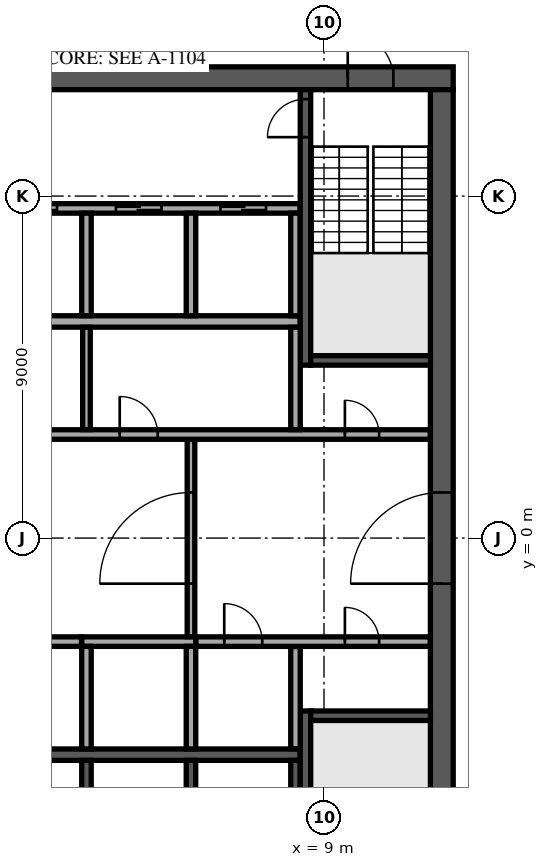
"""IFC4 building model, lengths in metres.
Left out: names, types, materials, properties, quantities, classifications, styles, units other than length and angle.
Written with IfcOpenShell. Run it as: python <this file> out.ifc"""

import sys

from ifc_helpers import new_model, si_unit, direction, frame, frame_2d, origin, place, context, subcontext, project, spatial, rectangle, extrude, element, fill, save


model = new_model("IFC4")
c1 = context("Model", 3, precision=1e-05, world=origin(), true_north=direction((0.0, 1.0)))
c2 = subcontext(c1, "Body", "Model", "MODEL_VIEW")
j1 = project(units=[si_unit("LENGTHUNIT", "METRE"), si_unit("PLANEANGLEUNIT", "RADIAN")], contexts=[c1])
p1 = place(None, origin())
s1 = spatial("IfcSite", under=j1, at=p1, CompositionType="ELEMENT")
p2 = place(p1, origin())
s2 = spatial("IfcBuilding", under=s1, at=p2, CompositionType="ELEMENT")
p3 = place(p2, frame((0.0, 0.0, 304.5)))
s3 = spatial("IfcBuildingStorey", under=s2, at=p3, CompositionType="ELEMENT", Elevation=304.5)
p4 = place(p3, frame((-12.4, 12.1, 0.0), z_axis=(0.0, 0.0, 1.0), x_axis=(1.0, 0.0, 0.0)))
e1 = element("IfcWall", 1, at=p4, inside=s3, PredefinedType="SHEAR", context=c2, shape_type="SweptSolid", body=[
    extrude(rectangle(XDim=24.8, YDim=0.6, at=frame_2d((12.4, 0.0))), origin(), (0.0, 0.0, 1.0), 3.65),
])
p5 = place(p4, frame((11.2, 0.0, 0.0)))
e2 = element("IfcOpeningElement", 2, at=p5, cuts=e1, PredefinedType="OPENING", context=c2, shape_type="SweptSolid", body=[
    extrude(rectangle(XDim=2.4, YDim=2.4, at=frame_2d((1.2, 1.2))), frame((0.0, 0.31, 0.0), z_axis=(0.0, -1.0, 0.0), x_axis=(1.0, 0.0, 0.0)), (0.0, 0.0, 1.0), 0.62),
])
p6 = place(p4, frame((22.025, 0.0, 0.0)))
e3 = element("IfcOpeningElement", 3, at=p6, cuts=e1, PredefinedType="OPENING", context=c2, shape_type="SweptSolid", body=[
    extrude(rectangle(XDim=1.2, YDim=2.1, at=frame_2d((0.6, 1.05))), frame((0.0, 0.31, 0.0), z_axis=(0.0, -1.0, 0.0), x_axis=(1.0, 0.0, 0.0)), (0.0, 0.0, 1.0), 0.62),
])
p7 = place(p4, frame((1.0, 0.0, 0.0)))
e4 = element("IfcOpeningElement", 4, at=p7, cuts=e1, PredefinedType="OPENING", context=c2, shape_type="SweptSolid", body=[
    extrude(rectangle(XDim=1.0, YDim=2.1, at=frame_2d((0.5, 1.05))), frame((0.0, 0.31, 0.0), z_axis=(0.0, -1.0, 0.0), x_axis=(1.0, 0.0, 0.0)), (0.0, 0.0, 1.0), 0.62),
])
p8 = place(p3, frame((12.1, -11.8, 0.0), z_axis=(0.0, 0.0, 1.0), x_axis=(0.0, 1.0, 0.0)))
e5 = element("IfcWall", 5, at=p8, inside=s3, PredefinedType="SHEAR", context=c2, shape_type="SweptSolid", body=[
    extrude(rectangle(XDim=23.6, YDim=0.6, at=frame_2d((11.8, 0.0))), origin(), (0.0, 0.0, 1.0), 3.65),
])
p9 = place(p8, frame((10.6, 0.0, 0.0)))
e6 = element("IfcOpeningElement", 6, at=p9, cuts=e5, PredefinedType="OPENING", context=c2, shape_type="SweptSolid", body=[
    extrude(rectangle(XDim=2.4, YDim=2.4, at=frame_2d((1.2, 1.2))), frame((0.0, 0.31, 0.0), z_axis=(0.0, -1.0, 0.0), x_axis=(1.0, 0.0, 0.0)), (0.0, 0.0, 1.0), 0.62),
])
p10 = place(p3, frame((-8.375, 5.7, 0.0), z_axis=(0.0, 0.0, 1.0), x_axis=(1.0, 0.0, 0.0)))
e7 = element("IfcWall", 7, at=p10, inside=s3, PredefinedType="SOLIDWALL", context=c2, shape_type="SweptSolid", body=[
    extrude(rectangle(XDim=16.75, YDim=0.3, at=frame_2d((8.375, 0.0))), origin(), (0.0, 0.0, 1.0), 3.65),
])
p11 = place(p3, frame((-2.875, -5.7, 0.0), z_axis=(0.0, 0.0, 1.0), x_axis=(1.0, 0.0, 0.0)))
e8 = element("IfcWall", 8, at=p11, inside=s3, PredefinedType="SOLIDWALL", context=c2, shape_type="SweptSolid", body=[
    extrude(rectangle(XDim=11.25, YDim=0.3, at=frame_2d((5.625, 0.0))), origin(), (0.0, 0.0, 1.0), 3.65),
])
p12 = place(p3, frame((-8.375, 8.675, 0.0), z_axis=(0.0, 0.0, 1.0), x_axis=(1.0, 0.0, 0.0)))
e9 = element("IfcWall", 9, at=p12, inside=s3, PredefinedType="SOLIDWALL", context=c2, shape_type="SweptSolid", body=[
    extrude(rectangle(XDim=16.75, YDim=0.25, at=frame_2d((8.375, 0.0))), origin(), (0.0, 0.0, 1.0), 3.65),
])
p13 = place(p12, frame((0.9, 0.0, 0.0)))
e10 = element("IfcOpeningElement", 10, at=p13, cuts=e9, PredefinedType="OPENING", context=c2, shape_type="SweptSolid", body=[
    extrude(rectangle(XDim=1.2, YDim=2.1, at=frame_2d((0.6, 1.05))), frame((0.0, 0.135, 0.0), z_axis=(0.0, -1.0, 0.0), x_axis=(1.0, 0.0, 0.0)), (0.0, 0.0, 1.0), 0.27),
])
p14 = place(p12, frame((3.65, 0.0, 0.0)))
e11 = element("IfcOpeningElement", 11, at=p14, cuts=e9, PredefinedType="OPENING", context=c2, shape_type="SweptSolid", body=[
    extrude(rectangle(XDim=1.2, YDim=2.1, at=frame_2d((0.6, 1.05))), frame((0.0, 0.135, 0.0), z_axis=(0.0, -1.0, 0.0), x_axis=(1.0, 0.0, 0.0)), (0.0, 0.0, 1.0), 0.27),
])
p15 = place(p12, frame((6.4, 0.0, 0.0)))
e12 = element("IfcOpeningElement", 12, at=p15, cuts=e9, PredefinedType="OPENING", context=c2, shape_type="SweptSolid", body=[
    extrude(rectangle(XDim=1.2, YDim=2.1, at=frame_2d((0.6, 1.05))), frame((0.0, 0.135, 0.0), z_axis=(0.0, -1.0, 0.0), x_axis=(1.0, 0.0, 0.0)), (0.0, 0.0, 1.0), 0.27),
])
p16 = place(p12, frame((9.15, 0.0, 0.0)))
e13 = element("IfcOpeningElement", 13, at=p16, cuts=e9, PredefinedType="OPENING", context=c2, shape_type="SweptSolid", body=[
    extrude(rectangle(XDim=1.2, YDim=2.1, at=frame_2d((0.6, 1.05))), frame((0.0, 0.135, 0.0), z_axis=(0.0, -1.0, 0.0), x_axis=(1.0, 0.0, 0.0)), (0.0, 0.0, 1.0), 0.27),
])
p17 = place(p12, frame((11.9, 0.0, 0.0)))
e14 = element("IfcOpeningElement", 14, at=p17, cuts=e9, PredefinedType="OPENING", context=c2, shape_type="SweptSolid", body=[
    extrude(rectangle(XDim=1.2, YDim=2.1, at=frame_2d((0.6, 1.05))), frame((0.0, 0.135, 0.0), z_axis=(0.0, -1.0, 0.0), x_axis=(1.0, 0.0, 0.0)), (0.0, 0.0, 1.0), 0.27),
])
p18 = place(p12, frame((14.65, 0.0, 0.0)))
e15 = element("IfcOpeningElement", 15, at=p18, cuts=e9, PredefinedType="OPENING", context=c2, shape_type="SweptSolid", body=[
    extrude(rectangle(XDim=1.2, YDim=2.1, at=frame_2d((0.6, 1.05))), frame((0.0, 0.135, 0.0), z_axis=(0.0, -1.0, 0.0), x_axis=(1.0, 0.0, 0.0)), (0.0, 0.0, 1.0), 0.27),
])
for number, where, z_axis, x_axis in (
    (16, (2.75, 5.85, 0.0), (0.0, 0.0, 1.0), (0.0, 1.0, 0.0)),
    (17, (5.5, 5.85, 0.0), (0.0, 0.0, 1.0), (0.0, 1.0, 0.0)),
    (18, (8.25, 5.85, 0.0), (0.0, 0.0, 1.0), (0.0, 1.0, 0.0)),
):
    element("IfcWall", number, at=place(p3, frame(where, z_axis=z_axis, x_axis=x_axis)), inside=s3, PredefinedType="SOLIDWALL", context=c2, shape_type="SweptSolid", body=[
        extrude(rectangle(XDim=2.7, YDim=0.25, at=frame_2d((1.35, 0.0))), origin(), (0.0, 0.0, 1.0), 3.65),
    ])
p19 = place(p3, frame((2.625, -2.725, 0.0), z_axis=(0.0, 0.0, 1.0), x_axis=(1.0, 0.0, 0.0)))
e19 = element("IfcWall", 19, at=p19, inside=s3, PredefinedType="SOLIDWALL", context=c2, shape_type="SweptSolid", body=[
    extrude(rectangle(XDim=3.0, YDim=0.25, at=frame_2d((1.5, 0.0))), origin(), (0.0, 0.0, 1.0), 3.65),
])
for number, where, z_axis, x_axis in (
    (20, (2.75, -5.55, 0.0), (0.0, 0.0, 1.0), (0.0, 1.0, 0.0)),
    (21, (5.5, -5.55, 0.0), (0.0, 0.0, 1.0), (0.0, 1.0, 0.0)),
    (22, (2.75, -8.55, 0.0), (0.0, 0.0, 1.0), (0.0, 1.0, 0.0)),
    (23, (5.5, -8.55, 0.0), (0.0, 0.0, 1.0), (0.0, 1.0, 0.0)),
    (24, (8.25, -8.55, 0.0), (0.0, 0.0, 1.0), (0.0, 1.0, 0.0)),
):
    element("IfcWall", number, at=place(p3, frame(where, z_axis=z_axis, x_axis=x_axis)), inside=s3, PredefinedType="SOLIDWALL", context=c2, shape_type="SweptSolid", body=[
        extrude(rectangle(XDim=2.7, YDim=0.25, at=frame_2d((1.35, 0.0))), origin(), (0.0, 0.0, 1.0), 3.65),
    ])
p20 = place(p3, frame((8.512, 4.55, 0.0), z_axis=(0.0, 0.0, 1.0), x_axis=(0.0, 1.0, 0.0)))
e25 = element("IfcWall", 25, at=p20, inside=s3, PredefinedType="SOLIDWALL", context=c2, shape_type="SweptSolid", body=[
    extrude(rectangle(XDim=7.25, YDim=0.275, at=frame_2d((3.625, 0.0))), origin(), (0.0, 0.0, 1.0), 3.65),
])
p21 = place(p20, frame((6.0, 0.0, 0.0)))
e26 = element("IfcOpeningElement", 26, at=p21, cuts=e25, PredefinedType="OPENING", context=c2, shape_type="SweptSolid", body=[
    extrude(rectangle(XDim=1.0, YDim=2.1, at=frame_2d((0.5, 1.05))), frame((0.0, 0.147, 0.0), z_axis=(0.0, -1.0, 0.0), x_axis=(1.0, 0.0, 0.0)), (0.0, 0.0, 1.0), 0.295),
])
p22 = place(p3, frame((8.65, 4.675, 0.0), z_axis=(0.0, 0.0, 1.0), x_axis=(1.0, 0.0, 0.0)))
e27 = element("IfcWall", 27, at=p22, inside=s3, PredefinedType="SOLIDWALL", context=c2, shape_type="SweptSolid", body=[
    extrude(rectangle(XDim=3.15, YDim=0.25, at=frame_2d((1.575, 0.0))), origin(), (0.0, 0.0, 1.0), 3.65),
])
p23 = place(p3, frame((8.512, -4.55, 0.0), z_axis=(0.0, 0.0, 1.0), x_axis=(0.0, -1.0, 0.0)))
e28 = element("IfcWall", 28, at=p23, inside=s3, PredefinedType="SOLIDWALL", context=c2, shape_type="SweptSolid", body=[
    extrude(rectangle(XDim=7.25, YDim=0.275, at=frame_2d((3.625, 0.0))), origin(), (0.0, 0.0, 1.0), 3.65),
])
p24 = place(p23, frame((6.0, 0.0, 0.0)))
e29 = element("IfcOpeningElement", 29, at=p24, cuts=e28, PredefinedType="OPENING", context=c2, shape_type="SweptSolid", body=[
    extrude(rectangle(XDim=1.0, YDim=2.1, at=frame_2d((0.5, 1.05))), frame((0.0, 0.147, 0.0), z_axis=(0.0, -1.0, 0.0), x_axis=(1.0, 0.0, 0.0)), (0.0, 0.0, 1.0), 0.295),
])
p25 = place(p3, frame((8.65, -4.675, 0.0), z_axis=(0.0, 0.0, 1.0), x_axis=(1.0, 0.0, 0.0)))
e30 = element("IfcWall", 30, at=p25, inside=s3, PredefinedType="SOLIDWALL", context=c2, shape_type="SweptSolid", body=[
    extrude(rectangle(XDim=3.15, YDim=0.25, at=frame_2d((1.575, 0.0))), origin(), (0.0, 0.0, 1.0), 3.65),
])
p26 = place(p3, frame((8.25, -5.545, 0.0), z_axis=(0.0, 0.0, 1.0), x_axis=(0.0, 1.0, 0.0)))
e31 = element("IfcWall", 31, at=p26, inside=s3, PredefinedType="PARTITIONING", context=c2, shape_type="SweptSolid", body=[
    extrude(rectangle(XDim=2.69, YDim=0.25, at=frame_2d((1.345, 0.0))), origin(), (0.0, 0.0, 1.0), 3.65),
])
p27 = place(p3, frame((-11.795, -2.725, 0.0), z_axis=(0.0, 0.0, 1.0), x_axis=(1.0, 0.0, 0.0)))
e32 = element("IfcWall", 32, at=p27, inside=s3, PredefinedType="PARTITIONING", context=c2, shape_type="SweptSolid", body=[
    extrude(rectangle(XDim=14.415, YDim=0.25, at=frame_2d((7.208, 0.0))), origin(), (0.0, 0.0, 1.0), 3.65),
])
p28 = place(p27, frame((1.295, 0.0, 0.0)))
e33 = element("IfcOpeningElement", 33, at=p28, cuts=e32, PredefinedType="OPENING", context=c2, shape_type="SweptSolid", body=[
    extrude(rectangle(XDim=1.0, YDim=2.1, at=frame_2d((0.5, 1.05))), frame((0.0, 0.135, 0.0), z_axis=(0.0, -1.0, 0.0), x_axis=(1.0, 0.0, 0.0)), (0.0, 0.0, 1.0), 0.27),
])
p29 = place(p27, frame((4.42, 0.0, 0.0)))
e34 = element("IfcOpeningElement", 34, at=p29, cuts=e32, PredefinedType="OPENING", context=c2, shape_type="SweptSolid", body=[
    extrude(rectangle(XDim=1.0, YDim=2.1, at=frame_2d((0.5, 1.05))), frame((0.0, 0.135, 0.0), z_axis=(0.0, -1.0, 0.0), x_axis=(1.0, 0.0, 0.0)), (0.0, 0.0, 1.0), 0.27),
])
p30 = place(p27, frame((9.92, 0.0, 0.0)))
e35 = element("IfcOpeningElement", 35, at=p30, cuts=e32, PredefinedType="OPENING", context=c2, shape_type="SweptSolid", body=[
    extrude(rectangle(XDim=1.0, YDim=2.1, at=frame_2d((0.5, 1.05))), frame((0.0, 0.135, 0.0), z_axis=(0.0, -1.0, 0.0), x_axis=(1.0, 0.0, 0.0)), (0.0, 0.0, 1.0), 0.27),
])
p31 = place(p3, frame((5.63, -2.725, 0.0), z_axis=(0.0, 0.0, 1.0), x_axis=(1.0, 0.0, 0.0)))
e36 = element("IfcWall", 36, at=p31, inside=s3, PredefinedType="PARTITIONING", context=c2, shape_type="SweptSolid", body=[
    extrude(rectangle(XDim=6.165, YDim=0.25, at=frame_2d((3.083, 0.0))), origin(), (0.0, 0.0, 1.0), 3.65),
])
p32 = place(p31, frame((0.745, 0.0, 0.0)))
e37 = element("IfcOpeningElement", 37, at=p32, cuts=e36, PredefinedType="OPENING", context=c2, shape_type="SweptSolid", body=[
    extrude(rectangle(XDim=1.0, YDim=2.1, at=frame_2d((0.5, 1.05))), frame((0.0, 0.135, 0.0), z_axis=(0.0, -1.0, 0.0), x_axis=(1.0, 0.0, 0.0)), (0.0, 0.0, 1.0), 0.27),
])
p33 = place(p31, frame((3.92, 0.0, 0.0)))
e38 = element("IfcOpeningElement", 38, at=p33, cuts=e36, PredefinedType="OPENING", context=c2, shape_type="SweptSolid", body=[
    extrude(rectangle(XDim=0.9, YDim=2.1, at=frame_2d((0.45, 1.05))), frame((0.0, 0.135, 0.0), z_axis=(0.0, -1.0, 0.0), x_axis=(1.0, 0.0, 0.0)), (0.0, 0.0, 1.0), 0.27),
])
p34 = place(p3, frame((5.5, -2.595, 0.0), z_axis=(0.0, 0.0, 1.0), x_axis=(0.0, 1.0, 0.0)))
e39 = element("IfcWall", 39, at=p34, inside=s3, PredefinedType="PARTITIONING", context=c2, shape_type="SweptSolid", body=[
    extrude(rectangle(XDim=5.19, YDim=0.2, at=frame_2d((2.595, 0.0))), origin(), (0.0, 0.0, 1.0), 3.65),
])
p35 = place(p34, frame((1.395, 0.0, 0.0)))
e40 = element("IfcOpeningElement", 40, at=p35, cuts=e39, PredefinedType="OPENING", context=c2, shape_type="SweptSolid", body=[
    extrude(rectangle(XDim=2.4, YDim=2.4, at=frame_2d((1.2, 1.2))), frame((0.0, 0.11, 0.0), z_axis=(0.0, -1.0, 0.0), x_axis=(1.0, 0.0, 0.0)), (0.0, 0.0, 1.0), 0.22),
])
p36 = place(p3, frame((-11.795, 2.725, 0.0), z_axis=(0.0, 0.0, 1.0), x_axis=(1.0, 0.0, 0.0)))
e41 = element("IfcWall", 41, at=p36, inside=s3, PredefinedType="PARTITIONING", context=c2, shape_type="SweptSolid", body=[
    extrude(rectangle(XDim=23.59, YDim=0.25, at=frame_2d((11.795, 0.0))), origin(), (0.0, 0.0, 1.0), 3.65),
])
p37 = place(p36, frame((21.345, 0.0, 0.0)))
e42 = element("IfcOpeningElement", 42, at=p37, cuts=e41, PredefinedType="OPENING", context=c2, shape_type="SweptSolid", body=[
    extrude(rectangle(XDim=0.9, YDim=2.1, at=frame_2d((0.45, 1.05))), frame((0.0, 0.135, 0.0), z_axis=(0.0, -1.0, 0.0), x_axis=(1.0, 0.0, 0.0)), (0.0, 0.0, 1.0), 0.27),
])
p38 = place(p36, frame((1.345, 0.0, 0.0)))
e43 = element("IfcOpeningElement", 43, at=p38, cuts=e41, PredefinedType="OPENING", context=c2, shape_type="SweptSolid", body=[
    extrude(rectangle(XDim=0.9, YDim=2.1, at=frame_2d((0.45, 1.05))), frame((0.0, 0.135, 0.0), z_axis=(0.0, -1.0, 0.0), x_axis=(1.0, 0.0, 0.0)), (0.0, 0.0, 1.0), 0.27),
])
p39 = place(p36, frame((4.32, 0.0, 0.0)))
e44 = element("IfcOpeningElement", 44, at=p39, cuts=e41, PredefinedType="OPENING", context=c2, shape_type="SweptSolid", body=[
    extrude(rectangle(XDim=1.2, YDim=2.1, at=frame_2d((0.6, 1.05))), frame((0.0, 0.135, 0.0), z_axis=(0.0, -1.0, 0.0), x_axis=(1.0, 0.0, 0.0)), (0.0, 0.0, 1.0), 0.27),
])
p40 = place(p36, frame((15.42, 0.0, 0.0)))
e45 = element("IfcOpeningElement", 45, at=p40, cuts=e41, PredefinedType="OPENING", context=c2, shape_type="SweptSolid", body=[
    extrude(rectangle(XDim=1.0, YDim=2.1, at=frame_2d((0.5, 1.05))), frame((0.0, 0.135, 0.0), z_axis=(0.0, -1.0, 0.0), x_axis=(1.0, 0.0, 0.0)), (0.0, 0.0, 1.0), 0.27),
])
p41 = place(p3, frame((2.75, 2.855, 0.0), z_axis=(0.0, 0.0, 1.0), x_axis=(0.0, 1.0, 0.0)))
e46 = element("IfcWall", 46, at=p41, inside=s3, PredefinedType="PARTITIONING", context=c2, shape_type="SweptSolid", body=[
    extrude(rectangle(XDim=2.69, YDim=0.2, at=frame_2d((1.345, 0.0))), origin(), (0.0, 0.0, 1.0), 3.65),
])
p42 = place(p3, frame((8.25, 2.855, 0.0), z_axis=(0.0, 0.0, 1.0), x_axis=(0.0, 1.0, 0.0)))
e47 = element("IfcWall", 47, at=p42, inside=s3, PredefinedType="PARTITIONING", context=c2, shape_type="SweptSolid", body=[
    extrude(rectangle(XDim=2.69, YDim=0.25, at=frame_2d((1.345, 0.0))), origin(), (0.0, 0.0, 1.0), 3.65),
])
p43 = place(p3, frame((-11.549, 24.631, 0.0), z_axis=(0.0, 0.0, 1.0), x_axis=(0.939685979246, -0.342038390256, 0.0)))
e48 = element("IfcWall", 48, at=p43, inside=s3, PredefinedType="PARTITIONING", context=c2, shape_type="SweptSolid", body=[
    extrude(rectangle(XDim=38.628, YDim=0.15, at=frame_2d((19.314, 0.0))), origin(), (0.0, 0.0, 1.0), 3.25),
])
p44 = place(p43, frame((5.05, 0.0, 0.0)))
e49 = element("IfcOpeningElement", 49, at=p44, cuts=e48, PredefinedType="OPENING", context=c2, shape_type="SweptSolid", body=[
    extrude(rectangle(XDim=1.8, YDim=2.1, at=frame_2d((0.9, 1.05))), frame((0.0, 0.085, 0.0), z_axis=(0.0, -1.0, 0.0), x_axis=(1.0, 0.0, 0.0)), (0.0, 0.0, 1.0), 0.17),
])
p45 = place(p43, frame((10.046, 0.0, 0.0)))
e50 = element("IfcOpeningElement", 50, at=p45, cuts=e48, PredefinedType="OPENING", context=c2, shape_type="SweptSolid", body=[
    extrude(rectangle(XDim=1.0, YDim=2.1, at=frame_2d((0.5, 1.05))), frame((0.0, 0.085, 0.0), z_axis=(0.0, -1.0, 0.0), x_axis=(1.0, 0.0, 0.0)), (0.0, 0.0, 1.0), 0.17),
])
p46 = place(p43, frame((15.561, 0.0, 0.0)))
e51 = element("IfcOpeningElement", 51, at=p46, cuts=e48, PredefinedType="OPENING", context=c2, shape_type="SweptSolid", body=[
    extrude(rectangle(XDim=1.0, YDim=2.1, at=frame_2d((0.5, 1.05))), frame((0.0, 0.085, 0.0), z_axis=(0.0, -1.0, 0.0), x_axis=(1.0, 0.0, 0.0)), (0.0, 0.0, 1.0), 0.17),
])
p47 = place(p43, frame((27.042, 0.0, 0.0)))
e52 = element("IfcOpeningElement", 52, at=p47, cuts=e48, PredefinedType="OPENING", context=c2, shape_type="SweptSolid", body=[
    extrude(rectangle(XDim=1.0, YDim=2.1, at=frame_2d((0.5, 1.05))), frame((0.0, 0.085, 0.0), z_axis=(0.0, -1.0, 0.0), x_axis=(1.0, 0.0, 0.0)), (0.0, 0.0, 1.0), 0.17),
])
p48 = place(p43, frame((35.506, 0.0, 0.0)))
e53 = element("IfcOpeningElement", 53, at=p48, cuts=e48, PredefinedType="OPENING", context=c2, shape_type="SweptSolid", body=[
    extrude(rectangle(XDim=1.0, YDim=2.1, at=frame_2d((0.5, 1.05))), frame((0.0, 0.085, 0.0), z_axis=(0.0, -1.0, 0.0), x_axis=(1.0, 0.0, 0.0)), (0.0, 0.0, 1.0), 0.17),
])
p49 = place(p6, origin())
e54 = element("IfcDoor", 54, at=p49, inside=s3, OperationType="SINGLE_SWING_LEFT", PredefinedType="DOOR", context=c2, shape_type="SweptSolid", body=[
    extrude(rectangle(XDim=1.2, YDim=2.1, at=frame_2d((0.6, 1.05))), frame((0.0, 0.025, 0.0), z_axis=(0.0, -1.0, 0.0), x_axis=(1.0, 0.0, 0.0)), (0.0, 0.0, 1.0), 0.05),
])
fill(e3, e54)
p50 = place(p9, origin())
e55 = element("IfcDoor", 55, at=p50, inside=s3, OperationType="SINGLE_SWING_LEFT", PredefinedType="DOOR", context=c2, shape_type="SweptSolid", body=[
    extrude(rectangle(XDim=2.4, YDim=2.4, at=frame_2d((1.2, 1.2))), frame((0.0, 0.025, 0.0), z_axis=(0.0, -1.0, 0.0), x_axis=(1.0, 0.0, 0.0)), (0.0, 0.0, 1.0), 0.05),
])
fill(e6, e55)
p51 = place(p16, origin())
e56 = element("IfcDoor", 56, at=p51, inside=s3, OperationType="DOUBLE_DOOR_SLIDING", PredefinedType="DOOR", context=c2, shape_type="SweptSolid", body=[
    extrude(rectangle(XDim=1.2, YDim=2.1, at=frame_2d((0.6, 1.05))), frame((0.0, 0.025, 0.0), z_axis=(0.0, -1.0, 0.0), x_axis=(1.0, 0.0, 0.0)), (0.0, 0.0, 1.0), 0.05),
])
fill(e13, e56)
p52 = place(p17, origin())
e57 = element("IfcDoor", 57, at=p52, inside=s3, OperationType="DOUBLE_DOOR_SLIDING", PredefinedType="DOOR", context=c2, shape_type="SweptSolid", body=[
    extrude(rectangle(XDim=1.2, YDim=2.1, at=frame_2d((0.6, 1.05))), frame((0.0, 0.025, 0.0), z_axis=(0.0, -1.0, 0.0), x_axis=(1.0, 0.0, 0.0)), (0.0, 0.0, 1.0), 0.05),
])
fill(e14, e57)
p53 = place(p18, origin())
e58 = element("IfcDoor", 58, at=p53, inside=s3, OperationType="DOUBLE_DOOR_SLIDING", PredefinedType="DOOR", context=c2, shape_type="SweptSolid", body=[
    extrude(rectangle(XDim=1.2, YDim=2.1, at=frame_2d((0.6, 1.05))), frame((0.0, 0.025, 0.0), z_axis=(0.0, -1.0, 0.0), x_axis=(1.0, 0.0, 0.0)), (0.0, 0.0, 1.0), 0.05),
])
fill(e15, e58)
p54 = place(p21, origin())
e59 = element("IfcDoor", 59, at=p54, inside=s3, OperationType="SINGLE_SWING_LEFT", PredefinedType="DOOR", context=c2, shape_type="SweptSolid", body=[
    extrude(rectangle(XDim=1.0, YDim=2.1, at=frame_2d((0.5, 1.05))), frame((0.0, 0.025, 0.0), z_axis=(0.0, -1.0, 0.0), x_axis=(1.0, 0.0, 0.0)), (0.0, 0.0, 1.0), 0.05),
])
fill(e26, e59)
p55 = place(p32, origin())
e60 = element("IfcDoor", 60, at=p55, inside=s3, OperationType="SINGLE_SWING_LEFT", PredefinedType="DOOR", context=c2, shape_type="SweptSolid", body=[
    extrude(rectangle(XDim=1.0, YDim=2.1, at=frame_2d((0.5, 1.05))), frame((0.0, 0.025, 0.0), z_axis=(0.0, -1.0, 0.0), x_axis=(1.0, 0.0, 0.0)), (0.0, 0.0, 1.0), 0.05),
])
fill(e37, e60)
p56 = place(p37, origin())
e61 = element("IfcDoor", 61, at=p56, inside=s3, OperationType="SINGLE_SWING_LEFT", PredefinedType="DOOR", context=c2, shape_type="SweptSolid", body=[
    extrude(rectangle(XDim=0.9, YDim=2.1, at=frame_2d((0.45, 1.05))), frame((0.0, 0.025, 0.0), z_axis=(0.0, -1.0, 0.0), x_axis=(1.0, 0.0, 0.0)), (0.0, 0.0, 1.0), 0.05),
])
fill(e42, e61)
p57 = place(p33, origin())
e62 = element("IfcDoor", 62, at=p57, inside=s3, OperationType="SINGLE_SWING_LEFT", PredefinedType="DOOR", context=c2, shape_type="SweptSolid", body=[
    extrude(rectangle(XDim=0.9, YDim=2.1, at=frame_2d((0.45, 1.05))), frame((0.0, 0.025, 0.0), z_axis=(0.0, -1.0, 0.0), x_axis=(1.0, 0.0, 0.0)), (0.0, 0.0, 1.0), 0.05),
])
fill(e38, e62)
p58 = place(p40, origin())
e63 = element("IfcDoor", 63, at=p58, inside=s3, OperationType="SINGLE_SWING_LEFT", PredefinedType="DOOR", context=c2, shape_type="SweptSolid", body=[
    extrude(rectangle(XDim=1.0, YDim=2.1, at=frame_2d((0.5, 1.05))), frame((0.0, 0.025, 0.0), z_axis=(0.0, -1.0, 0.0), x_axis=(1.0, 0.0, 0.0)), (0.0, 0.0, 1.0), 0.05),
])
fill(e45, e63)
p59 = place(p35, origin())
e64 = element("IfcDoor", 64, at=p59, inside=s3, OperationType="SINGLE_SWING_LEFT", PredefinedType="DOOR", context=c2, shape_type="SweptSolid", body=[
    extrude(rectangle(XDim=2.4, YDim=2.4, at=frame_2d((1.2, 1.2))), frame((0.0, 0.025, 0.0), z_axis=(0.0, -1.0, 0.0), x_axis=(1.0, 0.0, 0.0)), (0.0, 0.0, 1.0), 0.05),
])
fill(e40, e64)
save(model, sys.argv[1])
